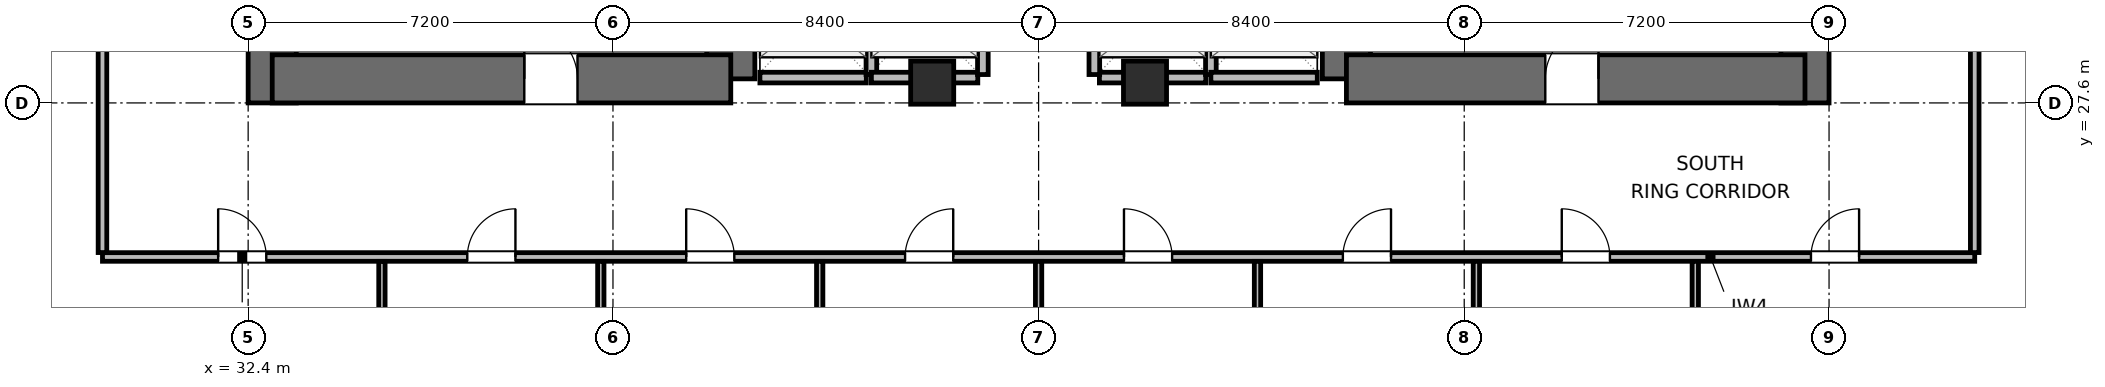
"""IFC4 building model, lengths in metres.
Left out: names, types, materials, properties, quantities, classifications, styles, units other than length and angle.
Written with IfcOpenShell. Run it as: python <this file> out.ifc"""

import sys

from ifc_helpers import new_model, si_unit, direction, frame, frame_2d, origin, origin_2d, place, context, subcontext, project, spatial, rectangle, extrude, element, fill, save


model = new_model("IFC4")
c1 = context("Model", 3, precision=1e-05, world=origin(), true_north=direction((0.0, 1.0)))
c2 = subcontext(c1, "Body", "Model", "MODEL_VIEW")
j1 = project(units=[si_unit("LENGTHUNIT", "METRE"), si_unit("PLANEANGLEUNIT", "RADIAN")], contexts=[c1])
p1 = place(None, origin())
s1 = spatial("IfcSite", under=j1, at=p1, CompositionType="ELEMENT")
p2 = place(p1, origin())
s2 = spatial("IfcBuilding", under=s1, at=p2, CompositionType="ELEMENT")
p3 = place(p2, frame((0.0, 0.0, 56.7)))
s3 = spatial("IfcBuildingStorey", under=s2, at=p3, CompositionType="ELEMENT", Elevation=56.7)
p4 = place(p3, frame((32.875, 27.6, 0.0), z_axis=(0.0, 0.0, 1.0), x_axis=(0.0, 1.0, 0.0)))
e1 = element("IfcWall", 1, at=p4, inside=s3, PredefinedType="SHEAR", context=c2, shape_type="SweptSolid", body=[
    extrude(rectangle(XDim=16.8, YDim=0.95, at=frame_2d((8.4, 0.0))), origin(), (0.0, 0.0, 1.0), 3.9),
])
p5 = place(p3, frame((41.925, 28.075, 0.0), z_axis=(0.0, 0.0, 1.0), x_axis=(0.0, 1.0, 0.0)))
e2 = element("IfcWall", 2, at=p5, inside=s3, PredefinedType="SHEAR", context=c2, shape_type="SweptSolid", body=[
    extrude(rectangle(XDim=6.325, YDim=0.95, at=frame_2d((3.163, 0.0))), origin(), (0.0, 0.0, 1.0), 3.9),
])
p6 = place(p3, frame((32.875, 28.075, 0.0), z_axis=(0.0, 0.0, 1.0), x_axis=(1.0, 0.0, 0.0)))
e3 = element("IfcWall", 3, at=p6, inside=s3, PredefinedType="SHEAR", context=c2, shape_type="SweptSolid", body=[
    extrude(rectangle(XDim=9.05, YDim=0.95, at=frame_2d((4.525, 0.0))), origin(), (0.0, 0.0, 1.0), 3.9),
])
p7 = place(p6, frame((4.975, 0.0, 0.0)))
e4 = element("IfcOpeningElement", 4, at=p7, cuts=e3, PredefinedType="OPENING", context=c2, shape_type="SweptSolid", body=[
    extrude(rectangle(XDim=1.05, YDim=2.04, at=frame_2d((0.525, 1.02))), frame((0.0, 0.485, 0.0), z_axis=(0.0, -1.0, 0.0), x_axis=(1.0, 0.0, 0.0)), (0.0, 0.0, 1.0), 0.97),
])
p8 = place(p3, frame((54.075, 28.075, 0.0), z_axis=(0.0, 0.0, 1.0), x_axis=(0.0, 1.0, 0.0)))
e5 = element("IfcWall", 5, at=p8, inside=s3, PredefinedType="SHEAR", context=c2, shape_type="SweptSolid", body=[
    extrude(rectangle(XDim=7.725, YDim=0.95, at=frame_2d((3.863, 0.0))), origin(), (0.0, 0.0, 1.0), 3.9),
])
p9 = place(p3, frame((63.125, 27.6, 0.0), z_axis=(0.0, 0.0, 1.0), x_axis=(0.0, 1.0, 0.0)))
e6 = element("IfcWall", 6, at=p9, inside=s3, PredefinedType="SHEAR", context=c2, shape_type="SweptSolid", body=[
    extrude(rectangle(XDim=16.8, YDim=0.95, at=frame_2d((8.4, 0.0))), origin(), (0.0, 0.0, 1.0), 3.9),
])
p10 = place(p3, frame((54.075, 28.075, 0.0), z_axis=(0.0, 0.0, 1.0), x_axis=(1.0, 0.0, 0.0)))
e7 = element("IfcWall", 7, at=p10, inside=s3, PredefinedType="SHEAR", context=c2, shape_type="SweptSolid", body=[
    extrude(rectangle(XDim=9.05, YDim=0.95, at=frame_2d((4.525, 0.0))), origin(), (0.0, 0.0, 1.0), 3.9),
])
p11 = place(p10, frame((3.925, 0.0, 0.0)))
e8 = element("IfcOpeningElement", 8, at=p11, cuts=e7, PredefinedType="OPENING", context=c2, shape_type="SweptSolid", body=[
    extrude(rectangle(XDim=1.05, YDim=2.04, at=frame_2d((0.525, 1.02))), frame((0.0, 0.485, 0.0), z_axis=(0.0, -1.0, 0.0), x_axis=(1.0, 0.0, 0.0)), (0.0, 0.0, 1.0), 0.97),
])
for number, where, z_axis, x_axis in (
    (9, (45.9, 28.0, 0.0), (0.0, 0.0, 1.0), (1.0, 0.0, 0.0)),
    (10, (50.1, 28.0, 0.0), (0.0, 0.0, 1.0), (1.0, 0.0, 0.0)),
):
    element("IfcColumn", number, at=place(p3, frame(where, z_axis=z_axis, x_axis=x_axis)), inside=s3, PredefinedType="COLUMN", context=c2, shape_type="SweptSolid", body=[
        extrude(rectangle(XDim=0.85, YDim=0.85, at=origin_2d()), origin(), (0.0, 0.0, 1.0), 3.9),
    ])
p12 = place(p3, frame((42.5, 28.1, 0.0), z_axis=(0.0, 0.0, 1.0), x_axis=(1.0, 0.0, 0.0)))
e11 = element("IfcWall", 11, at=p12, inside=s3, PredefinedType="PARTITIONING", context=c2, shape_type="SweptSolid", body=[
    extrude(rectangle(XDim=2.1, YDim=0.21, at=frame_2d((1.05, 0.0))), origin(), (0.0, 0.0, 1.0), 2.525),
])
p13 = place(p3, frame((44.7, 28.16, 0.0), z_axis=(0.0, 0.0, 1.0), x_axis=(0.0, 1.0, 0.0)))
e12 = element("IfcWall", 12, at=p13, inside=s3, PredefinedType="PARTITIONING", context=c2, shape_type="SweptSolid", body=[
    extrude(rectangle(XDim=2.28, YDim=0.21, at=frame_2d((1.14, 0.0))), origin(), (0.0, 0.0, 1.0), 3.64),
])
p14 = place(p3, frame((44.7, 28.1, 0.0), z_axis=(0.0, 0.0, 1.0), x_axis=(1.0, 0.0, 0.0)))
e13 = element("IfcWall", 13, at=p14, inside=s3, PredefinedType="PARTITIONING", context=c2, shape_type="SweptSolid", body=[
    extrude(rectangle(XDim=2.1, YDim=0.21, at=frame_2d((1.05, 0.0))), origin(), (0.0, 0.0, 1.0), 2.525),
])
p15 = place(p3, frame((46.9, 28.16, 0.0), z_axis=(0.0, 0.0, 1.0), x_axis=(0.0, 1.0, 0.0)))
e14 = element("IfcWall", 14, at=p15, inside=s3, PredefinedType="PARTITIONING", context=c2, shape_type="SweptSolid", body=[
    extrude(rectangle(XDim=2.28, YDim=0.21, at=frame_2d((1.14, 0.0))), origin(), (0.0, 0.0, 1.0), 3.64),
])
p16 = place(p3, frame((49.2, 28.1, 0.0), z_axis=(0.0, 0.0, 1.0), x_axis=(1.0, 0.0, 0.0)))
e15 = element("IfcWall", 15, at=p16, inside=s3, PredefinedType="PARTITIONING", context=c2, shape_type="SweptSolid", body=[
    extrude(rectangle(XDim=2.1, YDim=0.21, at=frame_2d((1.05, 0.0))), origin(), (0.0, 0.0, 1.0), 2.525),
])
for number, where, z_axis, x_axis in (
    (16, (49.1, 28.16, 0.0), (0.0, 0.0, 1.0), (0.0, 1.0, 0.0)),
    (17, (51.4, 28.16, 0.0), (0.0, 0.0, 1.0), (0.0, 1.0, 0.0)),
):
    element("IfcWall", number, at=place(p3, frame(where, z_axis=z_axis, x_axis=x_axis)), inside=s3, PredefinedType="PARTITIONING", context=c2, shape_type="SweptSolid", body=[
        extrude(rectangle(XDim=2.28, YDim=0.21, at=frame_2d((1.14, 0.0))), origin(), (0.0, 0.0, 1.0), 3.64),
    ])
p17 = place(p3, frame((51.4, 28.1, 0.0), z_axis=(0.0, 0.0, 1.0), x_axis=(1.0, 0.0, 0.0)))
e18 = element("IfcWall", 18, at=p17, inside=s3, PredefinedType="PARTITIONING", context=c2, shape_type="SweptSolid", body=[
    extrude(rectangle(XDim=2.1, YDim=0.21, at=frame_2d((1.05, 0.0))), origin(), (0.0, 0.0, 1.0), 2.525),
])
p18 = place(p3, frame((29.525, 24.56, 0.0), z_axis=(0.0, 0.0, 1.0), x_axis=(1.0, 0.0, 0.0)))
e19 = element("IfcWall", 19, at=p18, inside=s3, PredefinedType="PARTITIONING", context=c2, shape_type="SweptSolid", body=[
    extrude(rectangle(XDim=36.95, YDim=0.17, at=frame_2d((18.475, 0.0))), origin(), (0.0, 0.0, 1.0), 3.64),
])
p19 = place(p18, frame((2.283, 0.0, 0.0)))
e20 = element("IfcOpeningElement", 20, at=p19, cuts=e19, PredefinedType="OPENING", context=c2, shape_type="SweptSolid", body=[
    extrude(rectangle(XDim=0.95, YDim=2.04, at=frame_2d((0.475, 1.02))), frame((0.0, 0.095, 0.0), z_axis=(0.0, -1.0, 0.0), x_axis=(1.0, 0.0, 0.0)), (0.0, 0.0, 1.0), 0.19),
])
p20 = place(p18, frame((7.2, 0.0, 0.0)))
e21 = element("IfcOpeningElement", 21, at=p20, cuts=e19, PredefinedType="OPENING", context=c2, shape_type="SweptSolid", body=[
    extrude(rectangle(XDim=0.95, YDim=2.04, at=frame_2d((0.475, 1.02))), frame((0.0, 0.095, 0.0), z_axis=(0.0, -1.0, 0.0), x_axis=(1.0, 0.0, 0.0)), (0.0, 0.0, 1.0), 0.19),
])
p21 = place(p18, frame((11.52, 0.0, 0.0)))
e22 = element("IfcOpeningElement", 22, at=p21, cuts=e19, PredefinedType="OPENING", context=c2, shape_type="SweptSolid", body=[
    extrude(rectangle(XDim=0.95, YDim=2.04, at=frame_2d((0.475, 1.02))), frame((0.0, 0.095, 0.0), z_axis=(0.0, -1.0, 0.0), x_axis=(1.0, 0.0, 0.0)), (0.0, 0.0, 1.0), 0.19),
])
p22 = place(p18, frame((15.84, 0.0, 0.0)))
e23 = element("IfcOpeningElement", 23, at=p22, cuts=e19, PredefinedType="OPENING", context=c2, shape_type="SweptSolid", body=[
    extrude(rectangle(XDim=0.95, YDim=2.04, at=frame_2d((0.475, 1.02))), frame((0.0, 0.095, 0.0), z_axis=(0.0, -1.0, 0.0), x_axis=(1.0, 0.0, 0.0)), (0.0, 0.0, 1.0), 0.19),
])
p23 = place(p18, frame((20.16, 0.0, 0.0)))
e24 = element("IfcOpeningElement", 24, at=p23, cuts=e19, PredefinedType="OPENING", context=c2, shape_type="SweptSolid", body=[
    extrude(rectangle(XDim=0.95, YDim=2.04, at=frame_2d((0.475, 1.02))), frame((0.0, 0.095, 0.0), z_axis=(0.0, -1.0, 0.0), x_axis=(1.0, 0.0, 0.0)), (0.0, 0.0, 1.0), 0.19),
])
p24 = place(p18, frame((24.48, 0.0, 0.0)))
e25 = element("IfcOpeningElement", 25, at=p24, cuts=e19, PredefinedType="OPENING", context=c2, shape_type="SweptSolid", body=[
    extrude(rectangle(XDim=0.95, YDim=2.04, at=frame_2d((0.475, 1.02))), frame((0.0, 0.095, 0.0), z_axis=(0.0, -1.0, 0.0), x_axis=(1.0, 0.0, 0.0)), (0.0, 0.0, 1.0), 0.19),
])
p25 = place(p18, frame((28.8, 0.0, 0.0)))
e26 = element("IfcOpeningElement", 26, at=p25, cuts=e19, PredefinedType="OPENING", context=c2, shape_type="SweptSolid", body=[
    extrude(rectangle(XDim=0.95, YDim=2.04, at=frame_2d((0.475, 1.02))), frame((0.0, 0.095, 0.0), z_axis=(0.0, -1.0, 0.0), x_axis=(1.0, 0.0, 0.0)), (0.0, 0.0, 1.0), 0.19),
])
p26 = place(p18, frame((33.718, 0.0, 0.0)))
e27 = element("IfcOpeningElement", 27, at=p26, cuts=e19, PredefinedType="OPENING", context=c2, shape_type="SweptSolid", body=[
    extrude(rectangle(XDim=0.95, YDim=2.04, at=frame_2d((0.475, 1.02))), frame((0.0, 0.095, 0.0), z_axis=(0.0, -1.0, 0.0), x_axis=(1.0, 0.0, 0.0)), (0.0, 0.0, 1.0), 0.19),
])
p27 = place(p3, frame((29.525, 24.647, 0.0), z_axis=(0.0, 0.0, 1.0), x_axis=(0.0, 1.0, 0.0)))
e28 = element("IfcWall", 28, at=p27, inside=s3, PredefinedType="PARTITIONING", context=c2, shape_type="SweptSolid", body=[
    extrude(rectangle(XDim=22.706, YDim=0.17, at=frame_2d((11.353, 0.0))), origin(), (0.0, 0.0, 1.0), 3.64),
])
p28 = place(p27, frame((4.758, 0.0, 0.0)))
e29 = element("IfcOpeningElement", 29, at=p28, cuts=e28, PredefinedType="OPENING", context=c2, shape_type="SweptSolid", body=[
    extrude(rectangle(XDim=0.95, YDim=2.04, at=frame_2d((0.475, 1.02))), frame((0.0, 0.095, 0.0), z_axis=(0.0, -1.0, 0.0), x_axis=(1.0, 0.0, 0.0)), (0.0, 0.0, 1.0), 0.19),
])
p29 = place(p27, frame((16.198, 0.0, 0.0)))
e30 = element("IfcOpeningElement", 30, at=p29, cuts=e28, PredefinedType="OPENING", context=c2, shape_type="SweptSolid", body=[
    extrude(rectangle(XDim=0.95, YDim=2.04, at=frame_2d((0.475, 1.02))), frame((0.0, 0.095, 0.0), z_axis=(0.0, -1.0, 0.0), x_axis=(1.0, 0.0, 0.0)), (0.0, 0.0, 1.0), 0.19),
])
p30 = place(p3, frame((66.475, 24.647, 0.0), z_axis=(0.0, 0.0, 1.0), x_axis=(0.0, 1.0, 0.0)))
e31 = element("IfcWall", 31, at=p30, inside=s3, PredefinedType="PARTITIONING", context=c2, shape_type="SweptSolid", body=[
    extrude(rectangle(XDim=22.706, YDim=0.17, at=frame_2d((11.353, 0.0))), origin(), (0.0, 0.0, 1.0), 3.64),
])
p31 = place(p30, frame((5.758, 0.0, 0.0)))
e32 = element("IfcOpeningElement", 32, at=p31, cuts=e31, PredefinedType="OPENING", context=c2, shape_type="SweptSolid", body=[
    extrude(rectangle(XDim=0.95, YDim=2.04, at=frame_2d((0.475, 1.02))), frame((0.0, 0.095, 0.0), z_axis=(0.0, -1.0, 0.0), x_axis=(1.0, 0.0, 0.0)), (0.0, 0.0, 1.0), 0.19),
])
p32 = place(p30, frame((17.198, 0.0, 0.0)))
e33 = element("IfcOpeningElement", 33, at=p32, cuts=e31, PredefinedType="OPENING", context=c2, shape_type="SweptSolid", body=[
    extrude(rectangle(XDim=0.95, YDim=2.04, at=frame_2d((0.475, 1.02))), frame((0.0, 0.095, 0.0), z_axis=(0.0, -1.0, 0.0), x_axis=(1.0, 0.0, 0.0)), (0.0, 0.0, 1.0), 0.19),
])
p33 = place(p3, frame((35.04, 9.915, 0.0), z_axis=(0.0, 0.0, 1.0), x_axis=(0.0, 1.0, 0.0)))
e34 = element("IfcWall", 34, at=p33, inside=s3, PredefinedType="PARTITIONING", context=c2, shape_type="SweptSolid", body=[
    extrude(rectangle(XDim=14.558, YDim=0.125, at=frame_2d((7.279, 0.0))), origin(), (0.0, 0.0, 1.0), 3.64),
])
p34 = place(p3, frame((39.36, 9.915, 0.0), z_axis=(0.0, 0.0, 1.0), x_axis=(0.0, 1.0, 0.0)))
e35 = element("IfcWall", 35, at=p34, inside=s3, PredefinedType="PARTITIONING", context=c2, shape_type="SweptSolid", body=[
    extrude(rectangle(XDim=14.558, YDim=0.125, at=frame_2d((7.279, 0.0))), origin(), (0.0, 0.0, 1.0), 2.93),
])
p35 = place(p3, frame((43.68, 13.575, 0.0), z_axis=(0.0, 0.0, 1.0), x_axis=(0.0, 1.0, 0.0)))
e36 = element("IfcWall", 36, at=p35, inside=s3, PredefinedType="PARTITIONING", context=c2, shape_type="SweptSolid", body=[
    extrude(rectangle(XDim=10.898, YDim=0.125, at=frame_2d((5.449, 0.0))), origin(), (0.0, 0.0, 1.0), 3.003),
])
p36 = place(p3, frame((48.0, 11.515, 0.0), z_axis=(0.0, 0.0, 1.0), x_axis=(0.0, 1.0, 0.0)))
e37 = element("IfcWall", 37, at=p36, inside=s3, PredefinedType="PARTITIONING", context=c2, shape_type="SweptSolid", body=[
    extrude(rectangle(XDim=12.958, YDim=0.125, at=frame_2d((6.479, 0.0))), origin(), (0.0, 0.0, 1.0), 2.93),
])
p37 = place(p3, frame((52.32, 11.346, 0.0), z_axis=(0.0, 0.0, 1.0), x_axis=(0.0, 1.0, 0.0)))
e38 = element("IfcWall", 38, at=p37, inside=s3, PredefinedType="PARTITIONING", context=c2, shape_type="SweptSolid", body=[
    extrude(rectangle(XDim=13.127, YDim=0.125, at=frame_2d((6.563, 0.0))), origin(), (0.0, 0.0, 1.0), 3.003),
])
p38 = place(p3, frame((56.64, 9.915, 0.0), z_axis=(0.0, 0.0, 1.0), x_axis=(0.0, 1.0, 0.0)))
e39 = element("IfcWall", 39, at=p38, inside=s3, PredefinedType="PARTITIONING", context=c2, shape_type="SweptSolid", body=[
    extrude(rectangle(XDim=14.558, YDim=0.125, at=frame_2d((7.279, 0.0))), origin(), (0.0, 0.0, 1.0), 2.93),
])
p39 = place(p3, frame((60.96, 9.915, 0.0), z_axis=(0.0, 0.0, 1.0), x_axis=(0.0, 1.0, 0.0)))
e40 = element("IfcWall", 40, at=p39, inside=s3, PredefinedType="PARTITIONING", context=c2, shape_type="SweptSolid", body=[
    extrude(rectangle(XDim=14.558, YDim=0.125, at=frame_2d((7.279, 0.0))), origin(), (0.0, 0.0, 1.0), 3.64),
])
p40 = place(p7, origin())
e41 = element("IfcDoor", 41, at=p40, inside=s3, OperationType="SINGLE_SWING_LEFT", PredefinedType="DOOR", context=c2, shape_type="SweptSolid", body=[
    extrude(rectangle(XDim=1.05, YDim=2.04, at=frame_2d((0.525, 1.02))), frame((0.0, 0.025, 0.0), z_axis=(0.0, -1.0, 0.0), x_axis=(1.0, 0.0, 0.0)), (0.0, 0.0, 1.0), 0.05),
])
fill(e4, e41)
p41 = place(p11, origin())
e42 = element("IfcDoor", 42, at=p41, inside=s3, OperationType="SINGLE_SWING_RIGHT", PredefinedType="DOOR", context=c2, shape_type="SweptSolid", body=[
    extrude(rectangle(XDim=1.05, YDim=2.04, at=frame_2d((0.525, 1.02))), frame((0.0, 0.025, 0.0), z_axis=(0.0, -1.0, 0.0), x_axis=(1.0, 0.0, 0.0)), (0.0, 0.0, 1.0), 0.05),
])
fill(e8, e42)
p42 = place(p19, origin())
e43 = element("IfcDoor", 43, at=p42, inside=s3, OperationType="SINGLE_SWING_LEFT", PredefinedType="DOOR", context=c2, shape_type="SweptSolid", body=[
    extrude(rectangle(XDim=0.95, YDim=2.04, at=frame_2d((0.475, 1.02))), frame((0.0, 0.025, 0.0), z_axis=(0.0, -1.0, 0.0), x_axis=(1.0, 0.0, 0.0)), (0.0, 0.0, 1.0), 0.05),
])
fill(e20, e43)
p43 = place(p20, origin())
e44 = element("IfcDoor", 44, at=p43, inside=s3, OperationType="SINGLE_SWING_RIGHT", PredefinedType="DOOR", context=c2, shape_type="SweptSolid", body=[
    extrude(rectangle(XDim=0.95, YDim=2.04, at=frame_2d((0.475, 1.02))), frame((0.0, 0.025, 0.0), z_axis=(0.0, -1.0, 0.0), x_axis=(1.0, 0.0, 0.0)), (0.0, 0.0, 1.0), 0.05),
])
fill(e21, e44)
p44 = place(p21, origin())
e45 = element("IfcDoor", 45, at=p44, inside=s3, OperationType="SINGLE_SWING_LEFT", PredefinedType="DOOR", context=c2, shape_type="SweptSolid", body=[
    extrude(rectangle(XDim=0.95, YDim=2.04, at=frame_2d((0.475, 1.02))), frame((0.0, 0.025, 0.0), z_axis=(0.0, -1.0, 0.0), x_axis=(1.0, 0.0, 0.0)), (0.0, 0.0, 1.0), 0.05),
])
fill(e22, e45)
p45 = place(p22, origin())
e46 = element("IfcDoor", 46, at=p45, inside=s3, OperationType="SINGLE_SWING_RIGHT", PredefinedType="DOOR", context=c2, shape_type="SweptSolid", body=[
    extrude(rectangle(XDim=0.95, YDim=2.04, at=frame_2d((0.475, 1.02))), frame((0.0, 0.025, 0.0), z_axis=(0.0, -1.0, 0.0), x_axis=(1.0, 0.0, 0.0)), (0.0, 0.0, 1.0), 0.05),
])
fill(e23, e46)
p46 = place(p23, origin())
e47 = element("IfcDoor", 47, at=p46, inside=s3, OperationType="SINGLE_SWING_LEFT", PredefinedType="DOOR", context=c2, shape_type="SweptSolid", body=[
    extrude(rectangle(XDim=0.95, YDim=2.04, at=frame_2d((0.475, 1.02))), frame((0.0, 0.025, 0.0), z_axis=(0.0, -1.0, 0.0), x_axis=(1.0, 0.0, 0.0)), (0.0, 0.0, 1.0), 0.05),
])
fill(e24, e47)
p47 = place(p24, origin())
e48 = element("IfcDoor", 48, at=p47, inside=s3, OperationType="SINGLE_SWING_RIGHT", PredefinedType="DOOR", context=c2, shape_type="SweptSolid", body=[
    extrude(rectangle(XDim=0.95, YDim=2.04, at=frame_2d((0.475, 1.02))), frame((0.0, 0.025, 0.0), z_axis=(0.0, -1.0, 0.0), x_axis=(1.0, 0.0, 0.0)), (0.0, 0.0, 1.0), 0.05),
])
fill(e25, e48)
p48 = place(p25, origin())
e49 = element("IfcDoor", 49, at=p48, inside=s3, OperationType="SINGLE_SWING_LEFT", PredefinedType="DOOR", context=c2, shape_type="SweptSolid", body=[
    extrude(rectangle(XDim=0.95, YDim=2.04, at=frame_2d((0.475, 1.02))), frame((0.0, 0.025, 0.0), z_axis=(0.0, -1.0, 0.0), x_axis=(1.0, 0.0, 0.0)), (0.0, 0.0, 1.0), 0.05),
])
fill(e26, e49)
p49 = place(p26, origin())
e50 = element("IfcDoor", 50, at=p49, inside=s3, OperationType="SINGLE_SWING_RIGHT", PredefinedType="DOOR", context=c2, shape_type="SweptSolid", body=[
    extrude(rectangle(XDim=0.95, YDim=2.04, at=frame_2d((0.475, 1.02))), frame((0.0, 0.025, 0.0), z_axis=(0.0, -1.0, 0.0), x_axis=(1.0, 0.0, 0.0)), (0.0, 0.0, 1.0), 0.05),
])
fill(e27, e50)
save(model, sys.argv[1])
